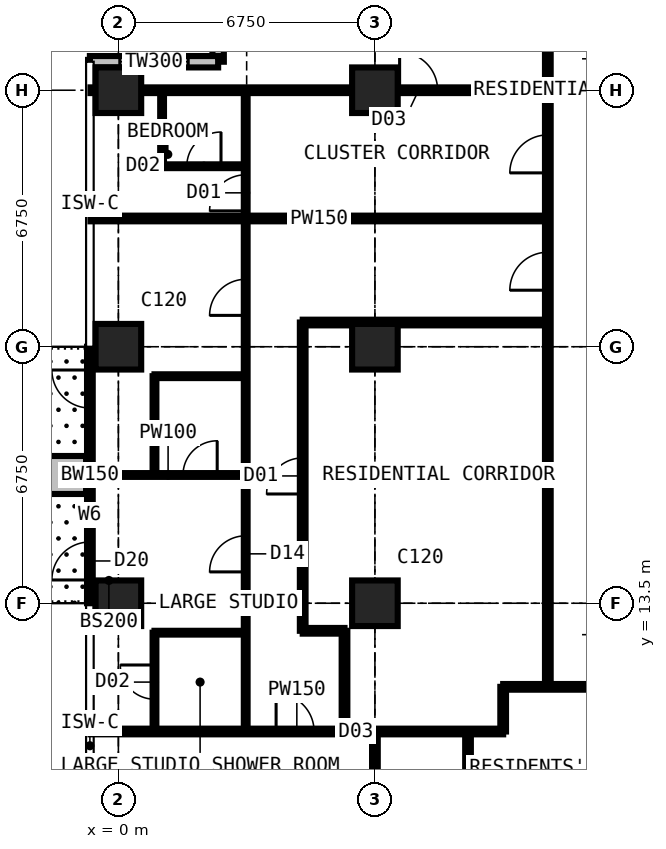
"""IFC4 building model, lengths in metres.
Left out: names, types, materials, properties, quantities, classifications, styles, units other than length and angle.
Written with IfcOpenShell. Run it as: python <this file> out.ifc"""

import sys

from ifc_helpers import new_model, si_unit, direction, frame, frame_2d, origin, origin_2d, place, context, subcontext, project, spatial, rectangle, extrude, element, fill, save


model = new_model("IFC4")
c1 = context("Model", 3, precision=1e-05, world=origin(), true_north=direction((0.0, 1.0)))
c2 = subcontext(c1, "Body", "Model", "MODEL_VIEW")
j1 = project(units=[si_unit("LENGTHUNIT", "METRE"), si_unit("PLANEANGLEUNIT", "RADIAN")], contexts=[c1])
p1 = place(None, origin())
s1 = spatial("IfcSite", under=j1, at=p1, CompositionType="ELEMENT")
p2 = place(p1, origin())
s2 = spatial("IfcBuilding", under=s1, at=p2, CompositionType="ELEMENT")
p3 = place(p2, frame((0.0, 0.0, 178.2)))
s3 = spatial("IfcBuildingStorey", under=s2, at=p3, CompositionType="ELEMENT", Elevation=178.2)
for number, where, z_axis, x_axis in (
    (1, (0.0, 13.5, 0.0), (0.0, 0.0, 1.0), (1.0, 0.0, 0.0)),
    (2, (0.0, 20.25, 0.0), (0.0, 0.0, 1.0), (1.0, 0.0, 0.0)),
    (3, (0.0, 27.0, 0.0), (0.0, 0.0, 1.0), (1.0, 0.0, 0.0)),
    (4, (6.75, 13.5, 0.0), (0.0, 0.0, 1.0), (1.0, 0.0, 0.0)),
    (5, (6.75, 20.25, 0.0), (0.0, 0.0, 1.0), (1.0, 0.0, 0.0)),
    (6, (6.75, 27.0, 0.0), (0.0, 0.0, 1.0), (1.0, 0.0, 0.0)),
):
    element("IfcColumn", number, at=place(p3, frame(where, z_axis=z_axis, x_axis=x_axis)), inside=s3, PredefinedType="COLUMN", context=c2, shape_type="SweptSolid", body=[
        extrude(rectangle(XDim=1.2, YDim=1.2, at=origin_2d()), origin(), (0.0, 0.0, 1.0), 3.6),
    ])
p4 = place(p3, frame((2.625, 31.125, 0.0), z_axis=(0.0, 0.0, 1.0), x_axis=(0.0, -1.0, 0.0)))
e7 = element("IfcWall", 7, at=p4, inside=s3, PredefinedType="SOLIDWALL", context=c2, shape_type="SweptSolid", body=[
    extrude(rectangle(XDim=3.375, YDim=0.3, at=frame_2d((1.688, 0.0))), origin(), (0.0, 0.0, 1.0), 3.375),
])
p5 = place(p4, frame((0.788, 0.0, 0.6)))
e8 = element("IfcOpeningElement", 8, at=p5, cuts=e7, PredefinedType="OPENING", context=c2, shape_type="SweptSolid", body=[
    extrude(rectangle(XDim=1.8, YDim=2.1, at=frame_2d((0.9, 1.05))), frame((0.0, 0.16, 0.0), z_axis=(0.0, -1.0, 0.0), x_axis=(1.0, 0.0, 0.0)), (0.0, 0.0, 1.0), 0.32),
])
p6 = place(p3, frame((2.625, 27.75, 0.0), z_axis=(0.0, 0.0, 1.0), x_axis=(-1.0, 0.0, 0.0)))
e9 = element("IfcWall", 9, at=p6, inside=s3, PredefinedType="SOLIDWALL", context=c2, shape_type="SweptSolid", body=[
    extrude(rectangle(XDim=3.375, YDim=0.3, at=frame_2d((1.688, 0.0))), origin(), (0.0, 0.0, 1.0), 3.375),
])
p7 = place(p6, frame((0.788, 0.0, 0.6)))
e10 = element("IfcOpeningElement", 10, at=p7, cuts=e9, PredefinedType="OPENING", context=c2, shape_type="SweptSolid", body=[
    extrude(rectangle(XDim=1.8, YDim=2.1, at=frame_2d((0.9, 1.05))), frame((0.0, 0.16, 0.0), z_axis=(0.0, -1.0, 0.0), x_axis=(1.0, 0.0, 0.0)), (0.0, 0.0, 1.0), 0.32),
])
p8 = place(p3, frame((-0.75, 13.5, 0.0), z_axis=(0.0, 0.0, 1.0), x_axis=(0.0, 1.0, 0.0)))
e11 = element("IfcWall", 11, at=p8, inside=s3, PredefinedType="SOLIDWALL", context=c2, shape_type="SweptSolid", body=[
    extrude(rectangle(XDim=6.75, YDim=0.15, at=frame_2d((3.375, 0.0))), origin(), (0.0, 0.0, 1.0), 3.375),
])
p9 = place(p8, frame((0.613, 0.0, 0.0)))
e12 = element("IfcOpeningElement", 12, at=p9, cuts=e11, PredefinedType="OPENING", context=c2, shape_type="SweptSolid", body=[
    extrude(rectangle(XDim=1.0, YDim=2.2, at=frame_2d((0.5, 1.1))), frame((0.0, 0.085, 0.0), z_axis=(0.0, -1.0, 0.0), x_axis=(1.0, 0.0, 0.0)), (0.0, 0.0, 1.0), 0.17),
])
p10 = place(p8, frame((1.725, 0.0, 0.9)))
e13 = element("IfcOpeningElement", 13, at=p10, cuts=e11, PredefinedType="OPENING", context=c2, shape_type="SweptSolid", body=[
    extrude(rectangle(XDim=1.2, YDim=1.8, at=frame_2d((0.6, 0.9))), frame((0.0, 0.085, 0.0), z_axis=(0.0, -1.0, 0.0), x_axis=(1.0, 0.0, 0.0)), (0.0, 0.0, 1.0), 0.17),
])
p11 = place(p8, frame((5.137, 0.0, 0.0)))
e14 = element("IfcOpeningElement", 14, at=p11, cuts=e11, PredefinedType="OPENING", context=c2, shape_type="SweptSolid", body=[
    extrude(rectangle(XDim=1.0, YDim=2.2, at=frame_2d((0.5, 1.1))), frame((0.0, 0.085, 0.0), z_axis=(0.0, -1.0, 0.0), x_axis=(1.0, 0.0, 0.0)), (0.0, 0.0, 1.0), 0.17),
])
p12 = place(p8, frame((3.825, 0.0, 0.9)))
e15 = element("IfcOpeningElement", 15, at=p12, cuts=e11, PredefinedType="OPENING", context=c2, shape_type="SweptSolid", body=[
    extrude(rectangle(XDim=1.2, YDim=1.8, at=frame_2d((0.6, 0.9))), frame((0.0, 0.085, 0.0), z_axis=(0.0, -1.0, 0.0), x_axis=(1.0, 0.0, 0.0)), (0.0, 0.0, 1.0), 0.17),
])
p13 = place(p3, frame((-0.85, 16.875, 0.0), z_axis=(0.0, 0.0, 1.0), x_axis=(-1.0, 0.0, 0.0)))
e16 = element("IfcWall", 16, at=p13, inside=s3, PredefinedType="USERDEFINED", context=c2, shape_type="SweptSolid", body=[
    extrude(rectangle(XDim=2.2, YDim=1.0, at=frame_2d((1.1, 0.0))), origin(), (0.0, 0.0, 1.0), 0.9),
])
p14 = place(p3, frame((-0.734, 10.125, 0.0), z_axis=(0.0, 0.0, 1.0), x_axis=(1.0, 0.0, 0.0)))
e17 = element("IfcWall", 17, at=p14, inside=s3, PredefinedType="PARTITIONING", context=c2, shape_type="SweptSolid", body=[
    extrude(rectangle(XDim=10.859, YDim=0.15, at=frame_2d((5.429, 0.0))), origin(), (0.0, 0.0, 1.0), 3.375),
])
p15 = place(p14, frame((4.884, 0.0, 0.0)))
e18 = element("IfcOpeningElement", 18, at=p15, cuts=e17, PredefinedType="OPENING", context=c2, shape_type="SweptSolid", body=[
    extrude(rectangle(XDim=1.0, YDim=2.2, at=frame_2d((0.5, 1.1))), frame((0.0, 0.085, 0.0), z_axis=(0.0, -1.0, 0.0), x_axis=(1.0, 0.0, 0.0)), (0.0, 0.0, 1.0), 0.17),
])
p16 = place(p3, frame((-0.734, 16.875, 0.0), z_axis=(0.0, 0.0, 1.0), x_axis=(1.0, 0.0, 0.0)))
e19 = element("IfcWall", 19, at=p16, inside=s3, PredefinedType="PARTITIONING", context=c2, shape_type="SweptSolid", body=[
    extrude(rectangle(XDim=4.084, YDim=0.1, at=frame_2d((2.042, 0.0))), origin(), (0.0, 0.0, 1.0), 3.375),
])
p17 = place(p16, frame((2.434, 0.0, 0.0)))
e20 = element("IfcOpeningElement", 20, at=p17, cuts=e19, PredefinedType="OPENING", context=c2, shape_type="SweptSolid", body=[
    extrude(rectangle(XDim=0.9, YDim=2.2, at=frame_2d((0.45, 1.1))), frame((0.0, 0.06, 0.0), z_axis=(0.0, -1.0, 0.0), x_axis=(1.0, 0.0, 0.0)), (0.0, 0.0, 1.0), 0.12),
])
p18 = place(p3, frame((-0.734, 23.625, 0.0), z_axis=(0.0, 0.0, 1.0), x_axis=(1.0, 0.0, 0.0)))
e21 = element("IfcWall", 21, at=p18, inside=s3, PredefinedType="PARTITIONING", context=c2, shape_type="SweptSolid", body=[
    extrude(rectangle(XDim=12.034, YDim=0.15, at=frame_2d((6.017, 0.0))), origin(), (0.0, 0.0, 1.0), 3.375),
])
p19 = place(p3, frame((-0.734, 27.0, 0.0), z_axis=(0.0, 0.0, 1.0), x_axis=(1.0, 0.0, 0.0)))
e22 = element("IfcWall", 22, at=p19, inside=s3, PredefinedType="PARTITIONING", context=c2, shape_type="SweptSolid", body=[
    extrude(rectangle(XDim=12.034, YDim=0.15, at=frame_2d((6.017, 0.0))), origin(), (0.0, 0.0, 1.0), 2.806),
])
p20 = place(p19, frame((8.134, 0.0, 0.0)))
e23 = element("IfcOpeningElement", 23, at=p20, cuts=e22, PredefinedType="OPENING", context=c2, shape_type="SweptSolid", body=[
    extrude(rectangle(XDim=1.0, YDim=2.2, at=frame_2d((0.5, 1.1))), frame((0.0, 0.085, 0.0), z_axis=(0.0, -1.0, 0.0), x_axis=(1.0, 0.0, 0.0)), (0.0, 0.0, 1.0), 0.17),
])
p21 = place(p3, frame((0.95, 10.125, 0.0), z_axis=(0.0, 0.0, 1.0), x_axis=(0.0, 1.0, 0.0)))
e24 = element("IfcWall", 24, at=p21, inside=s3, PredefinedType="PARTITIONING", context=c2, shape_type="SweptSolid", body=[
    extrude(rectangle(XDim=2.6, YDim=0.1, at=frame_2d((1.3, 0.0))), origin(), (0.0, 0.0, 1.0), 3.375),
])
p22 = place(p21, frame((0.85, 0.0, 0.0)))
e25 = element("IfcOpeningElement", 25, at=p22, cuts=e24, PredefinedType="OPENING", context=c2, shape_type="SweptSolid", body=[
    extrude(rectangle(XDim=0.9, YDim=2.2, at=frame_2d((0.45, 1.1))), frame((0.0, 0.06, 0.0), z_axis=(0.0, -1.0, 0.0), x_axis=(1.0, 0.0, 0.0)), (0.0, 0.0, 1.0), 0.12),
])
p23 = place(p3, frame((0.95, 12.725, 0.0), z_axis=(0.0, 0.0, 1.0), x_axis=(1.0, 0.0, 0.0)))
e26 = element("IfcWall", 26, at=p23, inside=s3, PredefinedType="PARTITIONING", context=c2, shape_type="SweptSolid", body=[
    extrude(rectangle(XDim=2.4, YDim=0.1, at=frame_2d((1.2, 0.0))), origin(), (0.0, 0.0, 1.0), 3.375),
])
p24 = place(p3, frame((0.95, 16.875, 0.0), z_axis=(0.0, 0.0, 1.0), x_axis=(0.0, 1.0, 0.0)))
e27 = element("IfcWall", 27, at=p24, inside=s3, PredefinedType="PARTITIONING", context=c2, shape_type="SweptSolid", body=[
    extrude(rectangle(XDim=2.6, YDim=0.1, at=frame_2d((1.3, 0.0))), origin(), (0.0, 0.0, 1.0), 3.375),
])
p25 = place(p3, frame((0.95, 19.475, 0.0), z_axis=(0.0, 0.0, 1.0), x_axis=(1.0, 0.0, 0.0)))
e28 = element("IfcWall", 28, at=p25, inside=s3, PredefinedType="PARTITIONING", context=c2, shape_type="SweptSolid", body=[
    extrude(rectangle(XDim=2.4, YDim=0.1, at=frame_2d((1.2, 0.0))), origin(), (0.0, 0.0, 1.0), 3.375),
])
p26 = place(p3, frame((1.15, 25.0, 0.0), z_axis=(0.0, 0.0, 1.0), x_axis=(0.0, 1.0, 0.0)))
e29 = element("IfcWall", 29, at=p26, inside=s3, PredefinedType="PARTITIONING", context=c2, shape_type="SweptSolid", body=[
    extrude(rectangle(XDim=2.0, YDim=0.1, at=frame_2d((1.0, 0.0))), origin(), (0.0, 0.0, 1.0), 3.375),
])
p27 = place(p3, frame((1.15, 25.0, 0.0), z_axis=(0.0, 0.0, 1.0), x_axis=(1.0, 0.0, 0.0)))
e30 = element("IfcWall", 30, at=p27, inside=s3, PredefinedType="PARTITIONING", context=c2, shape_type="SweptSolid", body=[
    extrude(rectangle(XDim=2.2, YDim=0.1, at=frame_2d((1.1, 0.0))), origin(), (0.0, 0.0, 1.0), 3.375),
])
p28 = place(p27, frame((0.65, 0.0, 0.0)))
e31 = element("IfcOpeningElement", 31, at=p28, cuts=e30, PredefinedType="OPENING", context=c2, shape_type="SweptSolid", body=[
    extrude(rectangle(XDim=0.9, YDim=2.2, at=frame_2d((0.45, 1.1))), frame((0.0, 0.06, 0.0), z_axis=(0.0, -1.0, 0.0), x_axis=(1.0, 0.0, 0.0)), (0.0, 0.0, 1.0), 0.12),
])
p29 = place(p3, frame((3.35, 10.125, 0.0), z_axis=(0.0, 0.0, 1.0), x_axis=(0.0, 1.0, 0.0)))
e32 = element("IfcWall", 32, at=p29, inside=s3, PredefinedType="PARTITIONING", context=c2, shape_type="SweptSolid", body=[
    extrude(rectangle(XDim=16.875, YDim=0.1, at=frame_2d((8.438, 0.0))), origin(), (0.0, 0.0, 1.0), 3.375),
])
p30 = place(p29, frame((13.7, 0.0, 0.0)))
e33 = element("IfcOpeningElement", 33, at=p30, cuts=e32, PredefinedType="OPENING", context=c2, shape_type="SweptSolid", body=[
    extrude(rectangle(XDim=0.95, YDim=2.2, at=frame_2d((0.475, 1.1))), frame((0.0, 0.06, 0.0), z_axis=(0.0, -1.0, 0.0), x_axis=(1.0, 0.0, 0.0)), (0.0, 0.0, 1.0), 0.12),
])
p31 = place(p29, frame((4.2, 0.0, 0.0)))
e34 = element("IfcOpeningElement", 34, at=p31, cuts=e32, PredefinedType="OPENING", context=c2, shape_type="SweptSolid", body=[
    extrude(rectangle(XDim=0.95, YDim=2.2, at=frame_2d((0.475, 1.1))), frame((0.0, 0.06, 0.0), z_axis=(0.0, -1.0, 0.0), x_axis=(1.0, 0.0, 0.0)), (0.0, 0.0, 1.0), 0.12),
])
p32 = place(p29, frame((10.95, 0.0, 0.0)))
e35 = element("IfcOpeningElement", 35, at=p32, cuts=e32, PredefinedType="OPENING", context=c2, shape_type="SweptSolid", body=[
    extrude(rectangle(XDim=0.95, YDim=2.2, at=frame_2d((0.475, 1.1))), frame((0.0, 0.06, 0.0), z_axis=(0.0, -1.0, 0.0), x_axis=(1.0, 0.0, 0.0)), (0.0, 0.0, 1.0), 0.12),
])
p33 = place(p3, frame((4.85, 12.775, 0.0), z_axis=(0.0, 0.0, 1.0), x_axis=(0.0, 1.0, 0.0)))
e36 = element("IfcWall", 36, at=p33, inside=s3, PredefinedType="PARTITIONING", context=c2, shape_type="SweptSolid", body=[
    extrude(rectangle(XDim=8.113, YDim=0.15, at=frame_2d((4.056, 0.0))), origin(), (0.0, 0.0, 1.0), 3.375),
])
p34 = place(p33, frame((3.6, 0.0, 0.0)))
e37 = element("IfcOpeningElement", 37, at=p34, cuts=e36, PredefinedType="OPENING", context=c2, shape_type="SweptSolid", body=[
    extrude(rectangle(XDim=0.95, YDim=2.2, at=frame_2d((0.475, 1.1))), frame((0.0, 0.085, 0.0), z_axis=(0.0, -1.0, 0.0), x_axis=(1.0, 0.0, 0.0)), (0.0, 0.0, 1.0), 0.17),
])
p35 = place(p3, frame((4.85, 12.775, 0.0), z_axis=(0.0, 0.0, 1.0), x_axis=(1.0, 0.0, 0.0)))
e38 = element("IfcWall", 38, at=p35, inside=s3, PredefinedType="PARTITIONING", context=c2, shape_type="SweptSolid", body=[
    extrude(rectangle(XDim=1.1, YDim=0.15, at=frame_2d((0.55, 0.0))), origin(), (0.0, 0.0, 1.0), 3.375),
])
p36 = place(p3, frame((4.85, 20.887, 0.0), z_axis=(0.0, 0.0, 1.0), x_axis=(1.0, 0.0, 0.0)))
e39 = element("IfcWall", 39, at=p36, inside=s3, PredefinedType="PARTITIONING", context=c2, shape_type="SweptSolid", body=[
    extrude(rectangle(XDim=6.45, YDim=0.15, at=frame_2d((3.225, 0.0))), origin(), (0.0, 0.0, 1.0), 3.375),
])
p37 = place(p3, frame((5.95, 10.125, 0.0), z_axis=(0.0, 0.0, 1.0), x_axis=(0.0, 1.0, 0.0)))
e40 = element("IfcWall", 40, at=p37, inside=s3, PredefinedType="PARTITIONING", context=c2, shape_type="SweptSolid", body=[
    extrude(rectangle(XDim=2.65, YDim=0.15, at=frame_2d((1.325, 0.0))), origin(), (0.0, 0.0, 1.0), 3.375),
])
p38 = place(p3, frame((6.75, -0.734, 0.0), z_axis=(0.0, 0.0, 1.0), x_axis=(0.0, 1.0, 0.0)))
e41 = element("IfcWall", 41, at=p38, inside=s3, PredefinedType="PARTITIONING", context=c2, shape_type="SweptSolid", body=[
    extrude(rectangle(XDim=10.859, YDim=0.15, at=frame_2d((5.429, 0.0))), origin(), (0.0, 0.0, 1.0), 2.877),
])
p39 = place(p3, frame((9.2, 4.85, 0.0), z_axis=(0.0, 0.0, 1.0), x_axis=(0.0, 1.0, 0.0)))
e42 = element("IfcWall", 42, at=p39, inside=s3, PredefinedType="PARTITIONING", context=c2, shape_type="SweptSolid", body=[
    extrude(rectangle(XDim=5.275, YDim=0.15, at=frame_2d((2.637, 0.0))), origin(), (0.0, 0.0, 1.0), 3.375),
])
p40 = place(p3, frame((10.125, 10.125, 0.0), z_axis=(0.0, 0.0, 1.0), x_axis=(0.0, 1.0, 0.0)))
e43 = element("IfcWall", 43, at=p40, inside=s3, PredefinedType="PARTITIONING", context=c2, shape_type="SweptSolid", body=[
    extrude(rectangle(XDim=1.175, YDim=0.15, at=frame_2d((0.587, 0.0))), origin(), (0.0, 0.0, 1.0), 3.375),
])
p41 = place(p3, frame((10.125, 11.3, 0.0), z_axis=(0.0, 0.0, 1.0), x_axis=(1.0, 0.0, 0.0)))
e44 = element("IfcWall", 44, at=p41, inside=s3, PredefinedType="PARTITIONING", context=c2, shape_type="SweptSolid", body=[
    extrude(rectangle(XDim=20.25, YDim=0.15, at=frame_2d((10.125, 0.0))), origin(), (0.0, 0.0, 1.0), 3.375),
])
p42 = place(p41, frame((5.2, 0.0, 0.0)))
e45 = element("IfcOpeningElement", 45, at=p42, cuts=e44, PredefinedType="OPENING", context=c2, shape_type="SweptSolid", body=[
    extrude(rectangle(XDim=1.0, YDim=2.2, at=frame_2d((0.5, 1.1))), frame((0.0, 0.085, 0.0), z_axis=(0.0, -1.0, 0.0), x_axis=(1.0, 0.0, 0.0)), (0.0, 0.0, 1.0), 0.17),
])
p43 = place(p41, frame((11.312, 0.0, 0.0)))
e46 = element("IfcOpeningElement", 46, at=p43, cuts=e44, PredefinedType="OPENING", context=c2, shape_type="SweptSolid", body=[
    extrude(rectangle(XDim=1.0, YDim=2.2, at=frame_2d((0.5, 1.1))), frame((0.0, 0.085, 0.0), z_axis=(0.0, -1.0, 0.0), x_axis=(1.0, 0.0, 0.0)), (0.0, 0.0, 1.0), 0.17),
])
p44 = place(p41, frame((2.425, 0.0, 0.0)))
e47 = element("IfcOpeningElement", 47, at=p44, cuts=e44, PredefinedType="OPENING", context=c2, shape_type="SweptSolid", body=[
    extrude(rectangle(XDim=0.95, YDim=2.2, at=frame_2d((0.475, 1.1))), frame((0.0, 0.085, 0.0), z_axis=(0.0, -1.0, 0.0), x_axis=(1.0, 0.0, 0.0)), (0.0, 0.0, 1.0), 0.17),
])
p45 = place(p3, frame((11.3, 11.3, 0.0), z_axis=(0.0, 0.0, 1.0), x_axis=(0.0, 1.0, 0.0)))
e48 = element("IfcWall", 48, at=p45, inside=s3, PredefinedType="PARTITIONING", context=c2, shape_type="SweptSolid", body=[
    extrude(rectangle(XDim=19.3, YDim=0.15, at=frame_2d((9.65, 0.0))), origin(), (0.0, 0.0, 1.0), 3.375),
])
p46 = place(p45, frame((13.525, 0.0, 0.0)))
e49 = element("IfcOpeningElement", 49, at=p46, cuts=e48, PredefinedType="OPENING", context=c2, shape_type="SweptSolid", body=[
    extrude(rectangle(XDim=1.0, YDim=2.2, at=frame_2d((0.5, 1.1))), frame((0.0, 0.085, 0.0), z_axis=(0.0, -1.0, 0.0), x_axis=(1.0, 0.0, 0.0)), (0.0, 0.0, 1.0), 0.17),
])
p47 = place(p45, frame((10.438, 0.0, 0.0)))
e50 = element("IfcOpeningElement", 50, at=p47, cuts=e48, PredefinedType="OPENING", context=c2, shape_type="SweptSolid", body=[
    extrude(rectangle(XDim=1.0, YDim=2.2, at=frame_2d((0.5, 1.1))), frame((0.0, 0.085, 0.0), z_axis=(0.0, -1.0, 0.0), x_axis=(1.0, 0.0, 0.0)), (0.0, 0.0, 1.0), 0.17),
])
p48 = place(p7, origin())
e51 = element("IfcWindow", 51, at=p48, inside=s3, PartitioningType="SINGLE_PANEL", PredefinedType="WINDOW", context=c2, shape_type="SweptSolid", body=[
    extrude(rectangle(XDim=1.8, YDim=2.1, at=frame_2d((0.9, 1.05))), frame((0.0, 0.03, 0.0), z_axis=(0.0, -1.0, 0.0), x_axis=(1.0, 0.0, 0.0)), (0.0, 0.0, 1.0), 0.06),
])
fill(e10, e51)
p49 = place(p9, origin())
e52 = element("IfcDoor", 52, at=p49, inside=s3, OperationType="SINGLE_SWING_LEFT", PredefinedType="DOOR", context=c2, shape_type="SweptSolid", body=[
    extrude(rectangle(XDim=1.0, YDim=2.2, at=frame_2d((0.5, 1.1))), frame((0.0, 0.025, 0.0), z_axis=(0.0, -1.0, 0.0), x_axis=(1.0, 0.0, 0.0)), (0.0, 0.0, 1.0), 0.05),
])
fill(e12, e52)
p50 = place(p10, origin())
e53 = element("IfcWindow", 53, at=p50, inside=s3, PartitioningType="SINGLE_PANEL", PredefinedType="WINDOW", context=c2, shape_type="SweptSolid", body=[
    extrude(rectangle(XDim=1.2, YDim=1.8, at=frame_2d((0.6, 0.9))), frame((0.0, 0.03, 0.0), z_axis=(0.0, -1.0, 0.0), x_axis=(1.0, 0.0, 0.0)), (0.0, 0.0, 1.0), 0.06),
])
fill(e13, e53)
p51 = place(p11, origin())
e54 = element("IfcDoor", 54, at=p51, inside=s3, OperationType="SINGLE_SWING_RIGHT", PredefinedType="DOOR", context=c2, shape_type="SweptSolid", body=[
    extrude(rectangle(XDim=1.0, YDim=2.2, at=frame_2d((0.5, 1.1))), frame((0.0, 0.025, 0.0), z_axis=(0.0, -1.0, 0.0), x_axis=(1.0, 0.0, 0.0)), (0.0, 0.0, 1.0), 0.05),
])
fill(e14, e54)
p52 = place(p12, origin())
e55 = element("IfcWindow", 55, at=p52, inside=s3, PartitioningType="SINGLE_PANEL", PredefinedType="WINDOW", context=c2, shape_type="SweptSolid", body=[
    extrude(rectangle(XDim=1.2, YDim=1.8, at=frame_2d((0.6, 0.9))), frame((0.0, 0.03, 0.0), z_axis=(0.0, -1.0, 0.0), x_axis=(1.0, 0.0, 0.0)), (0.0, 0.0, 1.0), 0.06),
])
fill(e15, e55)
p53 = place(p15, origin())
e56 = element("IfcDoor", 56, at=p53, inside=s3, OperationType="SINGLE_SWING_LEFT", PredefinedType="DOOR", context=c2, shape_type="SweptSolid", body=[
    extrude(rectangle(XDim=1.0, YDim=2.2, at=frame_2d((0.5, 1.1))), frame((0.0, 0.025, 0.0), z_axis=(0.0, -1.0, 0.0), x_axis=(1.0, 0.0, 0.0)), (0.0, 0.0, 1.0), 0.05),
])
fill(e18, e56)
p54 = place(p20, origin())
e57 = element("IfcDoor", 57, at=p54, inside=s3, OperationType="SINGLE_SWING_LEFT", PredefinedType="DOOR", context=c2, shape_type="SweptSolid", body=[
    extrude(rectangle(XDim=1.0, YDim=2.2, at=frame_2d((0.5, 1.1))), frame((0.0, 0.025, 0.0), z_axis=(0.0, -1.0, 0.0), x_axis=(1.0, 0.0, 0.0)), (0.0, 0.0, 1.0), 0.05),
])
fill(e23, e57)
p55 = place(p30, origin())
e58 = element("IfcDoor", 58, at=p55, inside=s3, OperationType="SINGLE_SWING_LEFT", PredefinedType="DOOR", context=c2, shape_type="SweptSolid", body=[
    extrude(rectangle(XDim=0.95, YDim=2.2, at=frame_2d((0.475, 1.1))), frame((0.0, 0.025, 0.0), z_axis=(0.0, -1.0, 0.0), x_axis=(1.0, 0.0, 0.0)), (0.0, 0.0, 1.0), 0.05),
])
fill(e33, e58)
p56 = place(p28, origin())
e59 = element("IfcDoor", 59, at=p56, inside=s3, OperationType="SINGLE_SWING_RIGHT", PredefinedType="DOOR", context=c2, shape_type="SweptSolid", body=[
    extrude(rectangle(XDim=0.9, YDim=2.2, at=frame_2d((0.45, 1.1))), frame((0.0, 0.025, 0.0), z_axis=(0.0, -1.0, 0.0), x_axis=(1.0, 0.0, 0.0)), (0.0, 0.0, 1.0), 0.05),
])
fill(e31, e59)
p57 = place(p46, origin())
e60 = element("IfcDoor", 60, at=p57, inside=s3, OperationType="SINGLE_SWING_LEFT", PredefinedType="DOOR", context=c2, shape_type="SweptSolid", body=[
    extrude(rectangle(XDim=1.0, YDim=2.2, at=frame_2d((0.5, 1.1))), frame((0.0, 0.025, 0.0), z_axis=(0.0, -1.0, 0.0), x_axis=(1.0, 0.0, 0.0)), (0.0, 0.0, 1.0), 0.05),
])
fill(e49, e60)
p58 = place(p31, origin())
e61 = element("IfcDoor", 61, at=p58, inside=s3, OperationType="SINGLE_SWING_LEFT", PredefinedType="DOOR", context=c2, shape_type="SweptSolid", body=[
    extrude(rectangle(XDim=0.95, YDim=2.2, at=frame_2d((0.475, 1.1))), frame((0.0, 0.025, 0.0), z_axis=(0.0, -1.0, 0.0), x_axis=(1.0, 0.0, 0.0)), (0.0, 0.0, 1.0), 0.05),
])
fill(e34, e61)
p59 = place(p22, origin())
e62 = element("IfcDoor", 62, at=p59, inside=s3, OperationType="SINGLE_SWING_RIGHT", PredefinedType="DOOR", context=c2, shape_type="SweptSolid", body=[
    extrude(rectangle(XDim=0.9, YDim=2.2, at=frame_2d((0.45, 1.1))), frame((0.0, 0.025, 0.0), z_axis=(0.0, -1.0, 0.0), x_axis=(1.0, 0.0, 0.0)), (0.0, 0.0, 1.0), 0.05),
])
fill(e25, e62)
p60 = place(p32, origin())
e63 = element("IfcDoor", 63, at=p60, inside=s3, OperationType="SINGLE_SWING_LEFT", PredefinedType="DOOR", context=c2, shape_type="SweptSolid", body=[
    extrude(rectangle(XDim=0.95, YDim=2.2, at=frame_2d((0.475, 1.1))), frame((0.0, 0.025, 0.0), z_axis=(0.0, -1.0, 0.0), x_axis=(1.0, 0.0, 0.0)), (0.0, 0.0, 1.0), 0.05),
])
fill(e35, e63)
p61 = place(p17, origin())
e64 = element("IfcDoor", 64, at=p61, inside=s3, OperationType="SINGLE_SWING_RIGHT", PredefinedType="DOOR", context=c2, shape_type="SweptSolid", body=[
    extrude(rectangle(XDim=0.9, YDim=2.2, at=frame_2d((0.45, 1.1))), frame((0.0, 0.025, 0.0), z_axis=(0.0, -1.0, 0.0), x_axis=(1.0, 0.0, 0.0)), (0.0, 0.0, 1.0), 0.05),
])
fill(e20, e64)
p62 = place(p47, origin())
e65 = element("IfcDoor", 65, at=p62, inside=s3, OperationType="SINGLE_SWING_LEFT", PredefinedType="DOOR", context=c2, shape_type="SweptSolid", body=[
    extrude(rectangle(XDim=1.0, YDim=2.2, at=frame_2d((0.5, 1.1))), frame((0.0, 0.025, 0.0), z_axis=(0.0, -1.0, 0.0), x_axis=(1.0, 0.0, 0.0)), (0.0, 0.0, 1.0), 0.05),
])
fill(e50, e65)
p63 = place(p34, origin())
e66 = element("IfcDoor", 66, at=p63, inside=s3, OperationType="SINGLE_SWING_LEFT", PredefinedType="DOOR", context=c2, shape_type="SweptSolid", body=[
    extrude(rectangle(XDim=0.95, YDim=2.2, at=frame_2d((0.475, 1.1))), frame((0.0, 0.025, 0.0), z_axis=(0.0, -1.0, 0.0), x_axis=(1.0, 0.0, 0.0)), (0.0, 0.0, 1.0), 0.05),
])
fill(e37, e66)
save(model, sys.argv[1])
